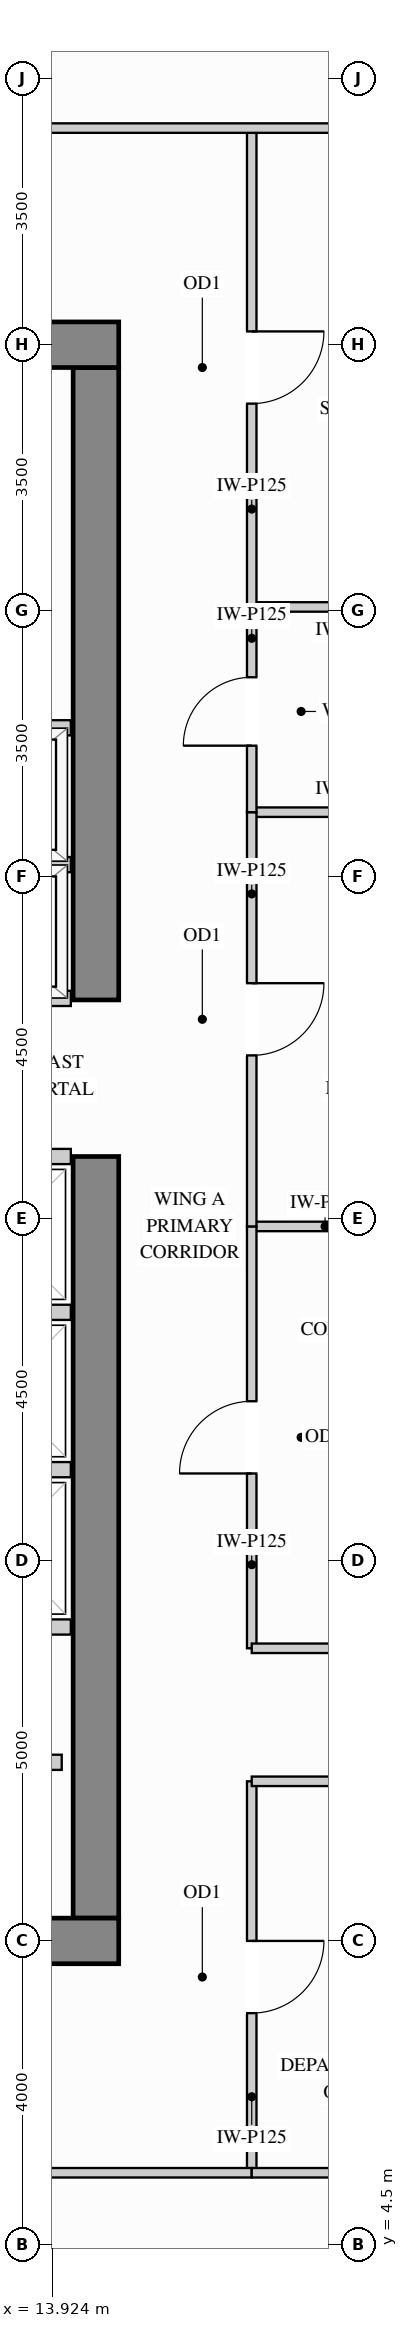
"""IFC4 building model, lengths in metres.
Left out: names, types, materials, properties, quantities, classifications, styles, units other than length and angle.
Written with IfcOpenShell. Run it as: python <this file> out.ifc"""

import sys

from ifc_helpers import new_model, si_unit, direction, frame, frame_2d, origin, place, context, subcontext, project, spatial, rectangle, extrude, source, transform, mapped, element, fill, save


model = new_model("IFC4")
c1 = context("Model", 3, precision=1e-05, world=origin(), true_north=direction((0.0, 1.0)))
c2 = subcontext(c1, "Body", "Model", "MODEL_VIEW")
j1 = project(units=[si_unit("LENGTHUNIT", "METRE"), si_unit("PLANEANGLEUNIT", "RADIAN")], contexts=[c1])
p1 = place(None, origin())
s1 = spatial("IfcSite", under=j1, at=p1, CompositionType="ELEMENT")
p2 = place(p1, origin())
s2 = spatial("IfcBuilding", under=s1, at=p2, CompositionType="ELEMENT")
p3 = place(p2, frame((0.0, 0.0, 197.1)))
s3 = spatial("IfcBuildingStorey", under=s2, at=p3, CompositionType="ELEMENT", Elevation=197.1)
m1 = source(origin(), c2, "Body", "SweptSolid", [
    extrude(rectangle(XDim=10.02, YDim=0.6, at=frame_2d((5.01, 0.0))), origin(), (0.0, 0.0, 1.0), 3.4),
])
p4 = place(p3, frame((14.5, 8.8, 0.0), z_axis=(0.0, 0.0, 1.0), x_axis=(0.0, 1.0, 0.0)))
e1 = element("IfcWall", 1, at=p4, inside=s3, PredefinedType="SHEAR", context=c2, shape_type="MappedRepresentation", body=[
    mapped(m1, transform((0.0, 0.0, 0.0), x_axis=(1.0, 0.0, 0.0), y_axis=(0.0, 1.0, 0.0), z_axis=(0.0, 0.0, 1.0))),
])
m2 = source(origin(), c2, "Body", "SweptSolid", [
    extrude(rectangle(XDim=8.32, YDim=0.6, at=frame_2d((4.16, 0.0))), origin(), (0.0, 0.0, 1.0), 3.4),
])
p5 = place(p3, frame((14.5, 20.88, 0.0), z_axis=(0.0, 0.0, 1.0), x_axis=(0.0, 1.0, 0.0)))
e2 = element("IfcWall", 2, at=p5, inside=s3, PredefinedType="SHEAR", context=c2, shape_type="MappedRepresentation", body=[
    mapped(m2, transform((0.0, 0.0, 0.0), x_axis=(1.0, 0.0, 0.0), y_axis=(0.0, 1.0, 0.0), z_axis=(0.0, 0.0, 1.0))),
])
m3 = source(origin(), c2, "Body", "SweptSolid", [
    extrude(rectangle(XDim=10.6, YDim=0.6, at=frame_2d((5.3, 0.0))), origin(), (0.0, 0.0, 1.0), 3.4),
])
for number, where, z_axis, x_axis in (
    (3, (4.2, 29.5, 0.0), (0.0, 0.0, 1.0), (1.0, 0.0, 0.0)),
    (4, (4.2, 8.5, 0.0), (0.0, 0.0, 1.0), (1.0, 0.0, 0.0)),
):
    element("IfcWall", number, at=place(p3, frame(where, z_axis=z_axis, x_axis=x_axis)), inside=s3, PredefinedType="SHEAR", context=c2, shape_type="MappedRepresentation", body=[
        mapped(m3, transform((0.0, 0.0, 0.0), x_axis=(1.0, 0.0, 0.0), y_axis=(0.0, 1.0, 0.0), z_axis=(0.0, 0.0, 1.0))),
    ])
m4 = source(origin(), c2, "Body", "SweptSolid", [
    extrude(rectangle(XDim=1.93, YDim=0.125, at=frame_2d((0.965, 0.0))), origin(), (0.0, 0.0, 1.0), 2.773),
])
p6 = place(p3, frame((16.55, 17.9, 0.0), z_axis=(0.0, 0.0, 1.0), x_axis=(1.0, 0.0, 0.0)))
e5 = element("IfcWall", 5, at=p6, inside=s3, PredefinedType="PARTITIONING", context=c2, shape_type="MappedRepresentation", body=[
    mapped(m4, transform((0.0, 0.0, 0.0), x_axis=(1.0, 0.0, 0.0), y_axis=(0.0, 1.0, 0.0), z_axis=(0.0, 0.0, 1.0))),
])
m5 = source(origin(), c2, "Body", "SweptSolid", [
    extrude(rectangle(XDim=2.598, YDim=0.125, at=frame_2d((1.299, 0.0))), origin(), (0.0, 0.0, 1.0), 3.385),
])
for number, where, z_axis, x_axis in (
    (6, (16.55, 23.35, 0.0), (0.0, 0.0, 1.0), (1.0, 0.0, 0.0)),
    (7, (16.55, 26.05, 0.0), (0.0, 0.0, 1.0), (1.0, 0.0, 0.0)),
):
    element("IfcWall", number, at=place(p3, frame(where, z_axis=z_axis, x_axis=x_axis)), inside=s3, PredefinedType="PARTITIONING", context=c2, shape_type="MappedRepresentation", body=[
        mapped(m5, transform((0.0, 0.0, 0.0), x_axis=(1.0, 0.0, 0.0), y_axis=(0.0, 1.0, 0.0), z_axis=(0.0, 0.0, 1.0))),
    ])
p7 = place(p3, frame((16.55, 12.35, 0.0), z_axis=(0.0, 0.0, 1.0), x_axis=(0.0, 1.0, 0.0)))
e8 = element("IfcWall", 8, at=p7, inside=s3, PredefinedType="PARTITIONING", context=c2, shape_type="SweptSolid", body=[
    extrude(rectangle(XDim=5.55, YDim=0.125, at=frame_2d((2.775, 0.0))), origin(), (0.0, 0.0, 1.0), 3.385),
])
p8 = place(p7, frame((2.3, 0.0, 0.0)))
e9 = element("IfcOpeningElement", 9, at=p8, cuts=e8, PredefinedType="OPENING", context=c2, shape_type="SweptSolid", body=[
    extrude(rectangle(XDim=0.95, YDim=2.15, at=frame_2d((0.475, 1.075))), frame((0.0, 0.073, 0.0), z_axis=(0.0, -1.0, 0.0), x_axis=(1.0, 0.0, 0.0)), (0.0, 0.0, 1.0), 0.145),
])
p9 = place(p3, frame((16.55, 17.9, 0.0), z_axis=(0.0, 0.0, 1.0), x_axis=(0.0, 1.0, 0.0)))
e10 = element("IfcWall", 10, at=p9, inside=s3, PredefinedType="PARTITIONING", context=c2, shape_type="SweptSolid", body=[
    extrude(rectangle(XDim=5.45, YDim=0.125, at=frame_2d((2.725, 0.0))), origin(), (0.0, 0.0, 1.0), 3.385),
])
p10 = place(p9, frame((2.25, 0.0, 0.0)))
e11 = element("IfcOpeningElement", 11, at=p10, cuts=e10, PredefinedType="OPENING", context=c2, shape_type="SweptSolid", body=[
    extrude(rectangle(XDim=0.95, YDim=2.15, at=frame_2d((0.475, 1.075))), frame((0.0, 0.073, 0.0), z_axis=(0.0, -1.0, 0.0), x_axis=(1.0, 0.0, 0.0)), (0.0, 0.0, 1.0), 0.145),
])
p11 = place(p3, frame((16.55, 26.05, 0.0), z_axis=(0.0, 0.0, 1.0), x_axis=(0.0, 1.0, 0.0)))
e12 = element("IfcWall", 12, at=p11, inside=s3, PredefinedType="PARTITIONING", context=c2, shape_type="SweptSolid", body=[
    extrude(rectangle(XDim=6.3, YDim=0.125, at=frame_2d((3.15, 0.0))), origin(), (0.0, 0.0, 1.0), 3.385),
])
p12 = place(p11, frame((2.675, 0.0, 0.0)))
e13 = element("IfcOpeningElement", 13, at=p12, cuts=e12, PredefinedType="OPENING", context=c2, shape_type="SweptSolid", body=[
    extrude(rectangle(XDim=0.95, YDim=2.15, at=frame_2d((0.475, 1.075))), frame((0.0, 0.073, 0.0), z_axis=(0.0, -1.0, 0.0), x_axis=(1.0, 0.0, 0.0)), (0.0, 0.0, 1.0), 0.145),
])
p13 = place(p3, frame((16.55, 5.45, 0.0), z_axis=(0.0, 0.0, 1.0), x_axis=(0.0, 1.0, 0.0)))
e14 = element("IfcWall", 14, at=p13, inside=s3, PredefinedType="PARTITIONING", context=c2, shape_type="SweptSolid", body=[
    extrude(rectangle(XDim=5.15, YDim=0.125, at=frame_2d((2.575, 0.0))), origin(), (0.0, 0.0, 1.0), 3.385),
])
p14 = place(p13, frame((2.1, 0.0, 0.0)))
e15 = element("IfcOpeningElement", 15, at=p14, cuts=e14, PredefinedType="OPENING", context=c2, shape_type="SweptSolid", body=[
    extrude(rectangle(XDim=0.95, YDim=2.15, at=frame_2d((0.475, 1.075))), frame((0.0, 0.073, 0.0), z_axis=(0.0, -1.0, 0.0), x_axis=(1.0, 0.0, 0.0)), (0.0, 0.0, 1.0), 0.145),
])
p15 = place(p3, frame((16.55, 23.35, 0.0), z_axis=(0.0, 0.0, 1.0), x_axis=(0.0, 1.0, 0.0)))
e16 = element("IfcWall", 16, at=p15, inside=s3, PredefinedType="PARTITIONING", context=c2, shape_type="SweptSolid", body=[
    extrude(rectangle(XDim=2.7, YDim=0.125, at=frame_2d((1.35, 0.0))), origin(), (0.0, 0.0, 1.0), 3.385),
])
p16 = place(p15, frame((0.875, 0.0, 0.0)))
e17 = element("IfcOpeningElement", 17, at=p16, cuts=e16, PredefinedType="OPENING", context=c2, shape_type="SweptSolid", body=[
    extrude(rectangle(XDim=0.9, YDim=2.15, at=frame_2d((0.45, 1.075))), frame((0.0, 0.073, 0.0), z_axis=(0.0, -1.0, 0.0), x_axis=(1.0, 0.0, 0.0)), (0.0, 0.0, 1.0), 0.145),
])
m6 = source(origin(), c2, "Body", "SweptSolid", [
    extrude(rectangle(XDim=5.798, YDim=0.125, at=frame_2d((2.899, 0.0))), origin(), (0.0, 0.0, 1.0), 3.385),
])
p17 = place(p3, frame((13.35, 32.35, 0.0), z_axis=(0.0, 0.0, 1.0), x_axis=(1.0, 0.0, 0.0)))
e18 = element("IfcWall", 18, at=p17, inside=s3, PredefinedType="PARTITIONING", context=c2, shape_type="MappedRepresentation", body=[
    mapped(m6, transform((0.0, 0.0, 0.0), x_axis=(1.0, 0.0, 0.0), y_axis=(0.0, 1.0, 0.0), z_axis=(0.0, 0.0, 1.0))),
])
m7 = source(origin(), c2, "Body", "SweptSolid", [
    extrude(rectangle(XDim=2.95, YDim=0.125, at=frame_2d((1.475, 0.0))), origin(), (0.0, 0.0, 1.0), 3.385),
])
for number, where, z_axis, x_axis in (
    (19, (16.55, 12.35, 0.0), (0.0, 0.0, 1.0), (1.0, 0.0, 0.0)),
    (20, (16.55, 10.6, 0.0), (0.0, 0.0, 1.0), (1.0, 0.0, 0.0)),
):
    element("IfcWall", number, at=place(p3, frame(where, z_axis=z_axis, x_axis=x_axis)), inside=s3, PredefinedType="PARTITIONING", context=c2, shape_type="MappedRepresentation", body=[
        mapped(m7, transform((0.0, 0.0, 0.0), x_axis=(1.0, 0.0, 0.0), y_axis=(0.0, 1.0, 0.0), z_axis=(0.0, 0.0, 1.0))),
    ])
p18 = place(p3, frame((2.45, 5.45, 0.0), z_axis=(0.0, 0.0, 1.0), x_axis=(1.0, 0.0, 0.0)))
e21 = element("IfcWall", 21, at=p18, inside=s3, PredefinedType="PARTITIONING", context=c2, shape_type="SweptSolid", body=[
    extrude(rectangle(XDim=14.1, YDim=0.125, at=frame_2d((7.05, 0.0))), origin(), (0.0, 0.0, 1.0), 3.385),
])
p19 = place(p18, frame((6.575, 0.0, 0.0)))
e22 = element("IfcOpeningElement", 22, at=p19, cuts=e21, PredefinedType="OPENING", context=c2, shape_type="SweptSolid", body=[
    extrude(rectangle(XDim=0.95, YDim=2.15, at=frame_2d((0.475, 1.075))), frame((0.0, 0.073, 0.0), z_axis=(0.0, -1.0, 0.0), x_axis=(1.0, 0.0, 0.0)), (0.0, 0.0, 1.0), 0.145),
])
p20 = place(p3, frame((16.55, 5.45, 0.0), z_axis=(0.0, 0.0, 1.0), x_axis=(1.0, 0.0, 0.0)))
e23 = element("IfcWall", 23, at=p20, inside=s3, PredefinedType="PARTITIONING", context=c2, shape_type="MappedRepresentation", body=[
    mapped(m5, transform((0.0, 0.0, 0.0), x_axis=(1.0, 0.0, 0.0), y_axis=(0.0, 1.0, 0.0), z_axis=(0.0, 0.0, 1.0))),
])
m8 = source(origin(), c2, "Body", "SweptSolid", [
    extrude(rectangle(XDim=1.63, YDim=0.2, at=frame_2d((0.815, 0.0))), origin(), (0.0, 0.0, 1.0), 3.385),
])
p21 = place(p3, frame((12.42, 10.85, 0.0), z_axis=(0.0, 0.0, 1.0), x_axis=(1.0, 0.0, 0.0)))
e24 = element("IfcWall", 24, at=p21, inside=s3, PredefinedType="PARTITIONING", context=c2, shape_type="MappedRepresentation", body=[
    mapped(m8, transform((0.0, 0.0, 0.0), x_axis=(1.0, 0.0, 0.0), y_axis=(0.0, 1.0, 0.0), z_axis=(0.0, 0.0, 1.0))),
])
m9 = source(origin(), c2, "Body", "SweptSolid", [
    extrude(rectangle(XDim=2.34, YDim=0.2, at=frame_2d((1.17, 0.0))), origin(), (0.0, 0.0, 1.0), 3.385),
])
for number, where, z_axis, x_axis in (
    (25, (11.83, 22.66, 0.0), (0.0, 0.0, 1.0), (1.0, 0.0, 0.0)),
    (26, (11.83, 20.9, 0.0), (0.0, 0.0, 1.0), (1.0, 0.0, 0.0)),
    (27, (11.83, 24.46, 0.0), (0.0, 0.0, 1.0), (1.0, 0.0, 0.0)),
):
    element("IfcWall", number, at=place(p3, frame(where, z_axis=z_axis, x_axis=x_axis)), inside=s3, PredefinedType="PARTITIONING", context=c2, shape_type="MappedRepresentation", body=[
        mapped(m9, transform((0.0, 0.0, 0.0), x_axis=(1.0, 0.0, 0.0), y_axis=(0.0, 1.0, 0.0), z_axis=(0.0, 0.0, 1.0))),
    ])
m10 = source(origin(), c2, "Body", "SweptSolid", [
    extrude(rectangle(XDim=1.94, YDim=0.2, at=frame_2d((0.97, 0.0))), origin(), (0.0, 0.0, 1.0), 3.385),
])
for number, where, z_axis, x_axis in (
    (28, (12.23, 14.7, 0.0), (0.0, 0.0, 1.0), (1.0, 0.0, 0.0)),
    (29, (12.23, 12.63, 0.0), (0.0, 0.0, 1.0), (1.0, 0.0, 0.0)),
    (30, (12.23, 16.77, 0.0), (0.0, 0.0, 1.0), (1.0, 0.0, 0.0)),
    (31, (12.23, 18.82, 0.0), (0.0, 0.0, 1.0), (1.0, 0.0, 0.0)),
):
    element("IfcWall", number, at=place(p3, frame(where, z_axis=z_axis, x_axis=x_axis)), inside=s3, PredefinedType="PARTITIONING", context=c2, shape_type="MappedRepresentation", body=[
        mapped(m10, transform((0.0, 0.0, 0.0), x_axis=(1.0, 0.0, 0.0), y_axis=(0.0, 1.0, 0.0), z_axis=(0.0, 0.0, 1.0))),
    ])
m11 = source(origin(), c2, "Body", "SweptSolid", [
    extrude(rectangle(XDim=0.95, YDim=2.15, at=frame_2d((0.475, 1.075))), frame((0.0, 0.025, 0.0), z_axis=(0.0, -1.0, 0.0), x_axis=(1.0, 0.0, 0.0)), (0.0, 0.0, 1.0), 0.05),
])
p22 = place(p14, origin())
e32 = element("IfcDoor", 32, at=p22, inside=s3, OperationType="SINGLE_SWING_RIGHT", PredefinedType="DOOR", context=c2, shape_type="MappedRepresentation", body=[
    mapped(m11, transform((0.0, 0.0, 0.0), x_axis=(1.0, 0.0, 0.0), y_axis=(0.0, 1.0, 0.0), z_axis=(0.0, 0.0, 1.0))),
])
fill(e15, e32)
p23 = place(p8, origin())
e33 = element("IfcDoor", 33, at=p23, inside=s3, OperationType="SINGLE_SWING_LEFT", PredefinedType="DOOR", context=c2, shape_type="MappedRepresentation", body=[
    mapped(m11, transform((0.0, 0.0, 0.0), x_axis=(1.0, 0.0, 0.0), y_axis=(0.0, 1.0, 0.0), z_axis=(0.0, 0.0, 1.0))),
])
fill(e9, e33)
p24 = place(p10, origin())
e34 = element("IfcDoor", 34, at=p24, inside=s3, OperationType="SINGLE_SWING_RIGHT", PredefinedType="DOOR", context=c2, shape_type="MappedRepresentation", body=[
    mapped(m11, transform((0.0, 0.0, 0.0), x_axis=(1.0, 0.0, 0.0), y_axis=(0.0, 1.0, 0.0), z_axis=(0.0, 0.0, 1.0))),
])
fill(e11, e34)
p25 = place(p12, origin())
e35 = element("IfcDoor", 35, at=p25, inside=s3, OperationType="SINGLE_SWING_RIGHT", PredefinedType="DOOR", context=c2, shape_type="MappedRepresentation", body=[
    mapped(m11, transform((0.0, 0.0, 0.0), x_axis=(1.0, 0.0, 0.0), y_axis=(0.0, 1.0, 0.0), z_axis=(0.0, 0.0, 1.0))),
])
fill(e13, e35)
m12 = source(origin(), c2, "Body", "SweptSolid", [
    extrude(rectangle(XDim=0.9, YDim=2.15, at=frame_2d((0.45, 1.075))), frame((0.0, 0.025, 0.0), z_axis=(0.0, -1.0, 0.0), x_axis=(1.0, 0.0, 0.0)), (0.0, 0.0, 1.0), 0.05),
])
p26 = place(p16, origin())
e36 = element("IfcDoor", 36, at=p26, inside=s3, OperationType="SINGLE_SWING_LEFT", PredefinedType="DOOR", context=c2, shape_type="MappedRepresentation", body=[
    mapped(m12, transform((0.0, 0.0, 0.0), x_axis=(1.0, 0.0, 0.0), y_axis=(0.0, 1.0, 0.0), z_axis=(0.0, 0.0, 1.0))),
])
fill(e17, e36)
save(model, sys.argv[1])
